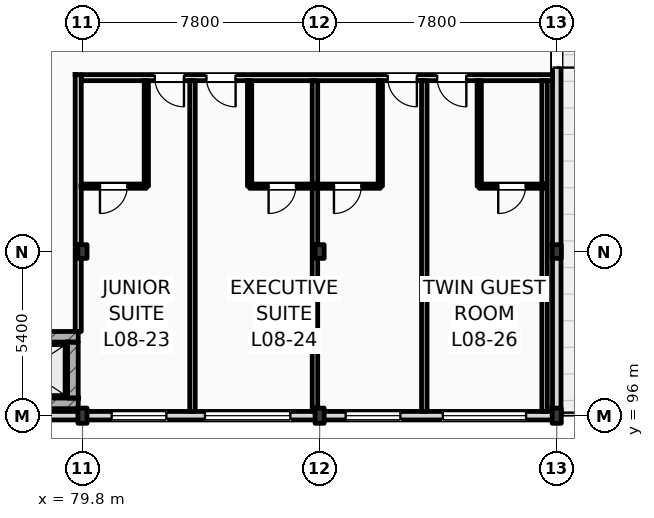
"""IFC4 building model, lengths in metres.
Left out: names, types, materials, properties, quantities, classifications, styles, units other than length and angle.
Written with IfcOpenShell. Run it as: python <this file> out.ifc"""

import sys

from ifc_helpers import new_model, si_unit, direction, frame, frame_2d, origin, origin_2d, place, context, subcontext, project, spatial, rectangle, i_section, extrude, element, fill, save


model = new_model("IFC4")
c1 = context("Model", 3, precision=1e-05, world=origin(), true_north=direction((0.0, 1.0)))
c2 = subcontext(c1, "Body", "Model", "MODEL_VIEW")
j1 = project(units=[si_unit("LENGTHUNIT", "METRE"), si_unit("PLANEANGLEUNIT", "RADIAN")], contexts=[c1])
p1 = place(None, origin())
s1 = spatial("IfcSite", under=j1, at=p1, CompositionType="ELEMENT")
p2 = place(p1, origin())
s2 = spatial("IfcBuilding", under=s1, at=p2, CompositionType="ELEMENT")
p3 = place(p2, frame((0.0, 0.0, 35.4)))
s3 = spatial("IfcBuildingStorey", under=s2, at=p3, CompositionType="ELEMENT", Elevation=35.4)
p4 = place(p3, frame((79.8, 96.0, 0.0), z_axis=(0.0, 0.0, 1.0), x_axis=(1.0, 0.0, 0.0)))
e1 = element("IfcColumn", 1, at=p4, inside=s3, PredefinedType="COLUMN", context=c2, shape_type="SweptSolid", body=[
    extrude(i_section(OverallWidth=0.3, OverallDepth=0.5, WebThickness=0.014, FlangeThickness=0.028, FilletRadius=0.027, at=origin_2d()), origin(), (0.0, 0.0, 1.0), 3.6),
])
p5 = place(p3, frame((79.8, 101.4, 0.0), z_axis=(0.0, 0.0, 1.0), x_axis=(1.0, 0.0, 0.0)))
e2 = element("IfcColumn", 2, at=p5, inside=s3, PredefinedType="COLUMN", context=c2, shape_type="SweptSolid", body=[
    extrude(i_section(OverallWidth=0.3, OverallDepth=0.45, WebThickness=0.014, FlangeThickness=0.026, FilletRadius=0.027, at=origin_2d()), origin(), (0.0, 0.0, 1.0), 3.6),
])
p6 = place(p3, frame((87.6, 96.0, 0.0), z_axis=(0.0, 0.0, 1.0), x_axis=(1.0, 0.0, 0.0)))
e3 = element("IfcColumn", 3, at=p6, inside=s3, PredefinedType="COLUMN", context=c2, shape_type="SweptSolid", body=[
    extrude(i_section(OverallWidth=0.3, OverallDepth=0.5, WebThickness=0.014, FlangeThickness=0.028, FilletRadius=0.027, at=origin_2d()), origin(), (0.0, 0.0, 1.0), 3.6),
])
p7 = place(p3, frame((87.6, 101.4, 0.0), z_axis=(0.0, 0.0, 1.0), x_axis=(1.0, 0.0, 0.0)))
e4 = element("IfcColumn", 4, at=p7, inside=s3, PredefinedType="COLUMN", context=c2, shape_type="SweptSolid", body=[
    extrude(i_section(OverallWidth=0.3, OverallDepth=0.45, WebThickness=0.014, FlangeThickness=0.026, FilletRadius=0.027, at=origin_2d()), origin(), (0.0, 0.0, 1.0), 3.6),
])
p8 = place(p3, frame((95.4, 96.0, 0.0), z_axis=(0.0, 0.0, 1.0), x_axis=(1.0, 0.0, 0.0)))
e5 = element("IfcColumn", 5, at=p8, inside=s3, PredefinedType="COLUMN", context=c2, shape_type="SweptSolid", body=[
    extrude(i_section(OverallWidth=0.3, OverallDepth=0.5, WebThickness=0.014, FlangeThickness=0.028, FilletRadius=0.027, at=origin_2d()), origin(), (0.0, 0.0, 1.0), 3.6),
])
p9 = place(p3, frame((95.4, 101.4, 0.0), z_axis=(0.0, 0.0, 1.0), x_axis=(1.0, 0.0, 0.0)))
e6 = element("IfcColumn", 6, at=p9, inside=s3, PredefinedType="COLUMN", context=c2, shape_type="SweptSolid", body=[
    extrude(i_section(OverallWidth=0.3, OverallDepth=0.45, WebThickness=0.014, FlangeThickness=0.026, FilletRadius=0.027, at=origin_2d()), origin(), (0.0, 0.0, 1.0), 3.6),
])
p10 = place(p3, frame((95.4, 96.0, 0.0), z_axis=(0.0, 0.0, 1.0), x_axis=(0.0, 1.0, 0.0)))
e7 = element("IfcWall", 7, at=p10, inside=s3, PredefinedType="STANDARD", context=c2, shape_type="SweptSolid", body=[
    extrude(rectangle(XDim=22.0, YDim=0.28, at=frame_2d((11.0, 0.0))), origin(), (0.0, 0.0, 1.0), 3.01),
])
p11 = place(p10, frame((11.45, 0.0, 0.0)))
e8 = element("IfcOpeningElement", 8, at=p11, cuts=e7, PredefinedType="OPENING", context=c2, shape_type="SweptSolid", body=[
    extrude(rectangle(XDim=1.8, YDim=2.4, at=frame_2d((0.9, 1.2))), frame((0.0, 0.15, 0.0), z_axis=(0.0, -1.0, 0.0), x_axis=(1.0, 0.0, 0.0)), (0.0, 0.0, 1.0), 0.3),
])
p12 = place(p3, frame((25.2, 96.0, 0.0), z_axis=(0.0, 0.0, 1.0), x_axis=(1.0, 0.0, 0.0)))
e9 = element("IfcWall", 9, at=p12, inside=s3, PredefinedType="STANDARD", context=c2, shape_type="SweptSolid", body=[
    extrude(rectangle(XDim=70.2, YDim=0.28, at=frame_2d((35.1, 0.0))), origin(), (0.0, 0.0, 1.0), 2.92),
])
p13 = place(p12, frame((16.694, 0.0, 0.9)))
e10 = element("IfcOpeningElement", 10, at=p13, cuts=e9, PredefinedType="OPENING", context=c2, shape_type="SweptSolid", body=[
    extrude(rectangle(XDim=1.8, YDim=1.84, at=frame_2d((0.9, 0.92))), frame((0.0, 0.15, 0.0), z_axis=(0.0, -1.0, 0.0), x_axis=(1.0, 0.0, 0.0)), (0.0, 0.0, 1.0), 0.3),
])
p14 = place(p12, frame((20.482, 0.0, 0.9)))
e11 = element("IfcOpeningElement", 11, at=p14, cuts=e9, PredefinedType="OPENING", context=c2, shape_type="SweptSolid", body=[
    extrude(rectangle(XDim=1.95, YDim=1.84, at=frame_2d((0.975, 0.92))), frame((0.0, 0.15, 0.0), z_axis=(0.0, -1.0, 0.0), x_axis=(1.0, 0.0, 0.0)), (0.0, 0.0, 1.0), 0.3),
])
p15 = place(p12, frame((24.316, 0.0, 0.9)))
e12 = element("IfcOpeningElement", 12, at=p15, cuts=e9, PredefinedType="OPENING", context=c2, shape_type="SweptSolid", body=[
    extrude(rectangle(XDim=2.1, YDim=1.84, at=frame_2d((1.05, 0.92))), frame((0.0, 0.15, 0.0), z_axis=(0.0, -1.0, 0.0), x_axis=(1.0, 0.0, 0.0)), (0.0, 0.0, 1.0), 0.3),
])
p16 = place(p12, frame((28.149, 0.0, 0.9)))
e13 = element("IfcOpeningElement", 13, at=p16, cuts=e9, PredefinedType="OPENING", context=c2, shape_type="SweptSolid", body=[
    extrude(rectangle(XDim=2.25, YDim=1.84, at=frame_2d((1.125, 0.92))), frame((0.0, 0.15, 0.0), z_axis=(0.0, -1.0, 0.0), x_axis=(1.0, 0.0, 0.0)), (0.0, 0.0, 1.0), 0.3),
])
p17 = place(p12, frame((31.983, 0.0, 0.9)))
e14 = element("IfcOpeningElement", 14, at=p17, cuts=e9, PredefinedType="OPENING", context=c2, shape_type="SweptSolid", body=[
    extrude(rectangle(XDim=2.4, YDim=1.84, at=frame_2d((1.2, 0.92))), frame((0.0, 0.15, 0.0), z_axis=(0.0, -1.0, 0.0), x_axis=(1.0, 0.0, 0.0)), (0.0, 0.0, 1.0), 0.3),
])
p18 = place(p12, frame((35.682, 0.0, 0.9)))
e15 = element("IfcOpeningElement", 15, at=p18, cuts=e9, PredefinedType="OPENING", context=c2, shape_type="SweptSolid", body=[
    extrude(rectangle(XDim=2.508, YDim=1.84, at=frame_2d((1.254, 0.92))), frame((0.0, 0.15, 0.0), z_axis=(0.0, -1.0, 0.0), x_axis=(1.0, 0.0, 0.0)), (0.0, 0.0, 1.0), 0.3),
])
p19 = place(p12, frame((55.56, 0.0, 0.9)))
e16 = element("IfcOpeningElement", 16, at=p19, cuts=e9, PredefinedType="OPENING", context=c2, shape_type="SweptSolid", body=[
    extrude(rectangle(XDim=1.8, YDim=1.84, at=frame_2d((0.9, 0.92))), frame((0.0, 0.15, 0.0), z_axis=(0.0, -1.0, 0.0), x_axis=(1.0, 0.0, 0.0)), (0.0, 0.0, 1.0), 0.3),
])
p20 = place(p12, frame((58.628, 0.0, 0.9)))
e17 = element("IfcOpeningElement", 17, at=p20, cuts=e9, PredefinedType="OPENING", context=c2, shape_type="SweptSolid", body=[
    extrude(rectangle(XDim=2.809, YDim=1.84, at=frame_2d((1.405, 0.92))), frame((0.0, 0.15, 0.0), z_axis=(0.0, -1.0, 0.0), x_axis=(1.0, 0.0, 0.0)), (0.0, 0.0, 1.0), 0.3),
])
p21 = place(p12, frame((63.257, 0.0, 0.9)))
e18 = element("IfcOpeningElement", 18, at=p21, cuts=e9, PredefinedType="OPENING", context=c2, shape_type="SweptSolid", body=[
    extrude(rectangle(XDim=1.8, YDim=1.84, at=frame_2d((0.9, 0.92))), frame((0.0, 0.15, 0.0), z_axis=(0.0, -1.0, 0.0), x_axis=(1.0, 0.0, 0.0)), (0.0, 0.0, 1.0), 0.3),
])
p22 = place(p12, frame((66.453, 0.0, 0.9)))
e19 = element("IfcOpeningElement", 19, at=p22, cuts=e9, PredefinedType="OPENING", context=c2, shape_type="SweptSolid", body=[
    extrude(rectangle(XDim=2.737, YDim=1.84, at=frame_2d((1.369, 0.92))), frame((0.0, 0.15, 0.0), z_axis=(0.0, -1.0, 0.0), x_axis=(1.0, 0.0, 0.0)), (0.0, 0.0, 1.0), 0.3),
])
p23 = place(p3, frame((76.67, 98.595, 0.0), z_axis=(0.0, 0.0, 1.0), x_axis=(1.0, 0.0, 0.0)))
e20 = element("IfcWall", 20, at=p23, inside=s3, PredefinedType="SHEAR", context=c2, shape_type="SweptSolid", body=[
    extrude(rectangle(XDim=2.99, YDim=0.35, at=frame_2d((1.495, 0.0))), origin(), (0.0, 0.0, 1.0), 3.38),
])
p24 = place(p23, frame((0.695, 0.0, 0.0)))
e21 = element("IfcOpeningElement", 21, at=p24, cuts=e20, PredefinedType="OPENING", context=c2, shape_type="SweptSolid", body=[
    extrude(rectangle(XDim=1.25, YDim=2.25, at=frame_2d((0.625, 1.125))), frame((0.0, 0.185, 0.0), z_axis=(0.0, -1.0, 0.0), x_axis=(1.0, 0.0, 0.0)), (0.0, 0.0, 1.0), 0.37),
])
p25 = place(p3, frame((76.67, 96.405, 0.0), z_axis=(0.0, 0.0, 1.0), x_axis=(1.0, 0.0, 0.0)))
e22 = element("IfcWall", 22, at=p25, inside=s3, PredefinedType="SHEAR", context=c2, shape_type="SweptSolid", body=[
    extrude(rectangle(XDim=2.99, YDim=0.35, at=frame_2d((1.495, 0.0))), origin(), (0.0, 0.0, 1.0), 3.38),
])
p26 = place(p3, frame((79.485, 96.58, 0.0), z_axis=(0.0, 0.0, 1.0), x_axis=(0.0, 1.0, 0.0)))
e23 = element("IfcWall", 23, at=p26, inside=s3, PredefinedType="SHEAR", context=c2, shape_type="SweptSolid", body=[
    extrude(rectangle(XDim=1.84, YDim=0.35, at=frame_2d((0.92, 0.0))), origin(), (0.0, 0.0, 1.0), 3.01),
])
p27 = place(p3, frame((79.76, 107.12, 0.0), z_axis=(0.0, 0.0, 1.0), x_axis=(1.0, 0.0, 0.0)))
e24 = element("IfcWall", 24, at=p27, inside=s3, PredefinedType="PARTITIONING", context=c2, shape_type="SweptSolid", body=[
    extrude(rectangle(XDim=15.5, YDim=0.2, at=frame_2d((7.75, 0.0))), origin(), (0.0, 0.0, 1.0), 3.38),
])
p28 = place(p27, frame((2.419, 0.0, 0.0)))
e25 = element("IfcOpeningElement", 25, at=p28, cuts=e24, PredefinedType="OPENING", context=c2, shape_type="SweptSolid", body=[
    extrude(rectangle(XDim=0.96, YDim=2.2, at=frame_2d((0.48, 1.1))), frame((0.0, 0.11, 0.0), z_axis=(0.0, -1.0, 0.0), x_axis=(1.0, 0.0, 0.0)), (0.0, 0.0, 1.0), 0.22),
])
p29 = place(p27, frame((4.117, 0.0, 0.0)))
e26 = element("IfcOpeningElement", 26, at=p29, cuts=e24, PredefinedType="OPENING", context=c2, shape_type="SweptSolid", body=[
    extrude(rectangle(XDim=0.96, YDim=2.2, at=frame_2d((0.48, 1.1))), frame((0.0, 0.11, 0.0), z_axis=(0.0, -1.0, 0.0), x_axis=(1.0, 0.0, 0.0)), (0.0, 0.0, 1.0), 0.22),
])
p30 = place(p27, frame((10.08, 0.0, 0.0)))
e27 = element("IfcOpeningElement", 27, at=p30, cuts=e24, PredefinedType="OPENING", context=c2, shape_type="SweptSolid", body=[
    extrude(rectangle(XDim=0.96, YDim=2.2, at=frame_2d((0.48, 1.1))), frame((0.0, 0.11, 0.0), z_axis=(0.0, -1.0, 0.0), x_axis=(1.0, 0.0, 0.0)), (0.0, 0.0, 1.0), 0.22),
])
p31 = place(p27, frame((11.706, 0.0, 0.0)))
e28 = element("IfcOpeningElement", 28, at=p31, cuts=e24, PredefinedType="OPENING", context=c2, shape_type="SweptSolid", body=[
    extrude(rectangle(XDim=0.96, YDim=2.2, at=frame_2d((0.48, 1.1))), frame((0.0, 0.11, 0.0), z_axis=(0.0, -1.0, 0.0), x_axis=(1.0, 0.0, 0.0)), (0.0, 0.0, 1.0), 0.22),
])
p32 = place(p3, frame((79.66, 98.77, 0.0), z_axis=(0.0, 0.0, 1.0), x_axis=(0.0, 1.0, 0.0)))
e29 = element("IfcWall", 29, at=p32, inside=s3, PredefinedType="PARTITIONING", context=c2, shape_type="SweptSolid", body=[
    extrude(rectangle(XDim=8.45, YDim=0.2, at=frame_2d((4.225, 0.0))), origin(), (0.0, 0.0, 1.0), 3.01),
])
p33 = place(p3, frame((83.418, 96.14, 0.0), z_axis=(0.0, 0.0, 1.0), x_axis=(0.0, 1.0, 0.0)))
e30 = element("IfcWall", 30, at=p33, inside=s3, PredefinedType="PARTITIONING", context=c2, shape_type="SweptSolid", body=[
    extrude(rectangle(XDim=10.88, YDim=0.18, at=frame_2d((5.44, 0.0))), origin(), (0.0, 0.0, 1.0), 3.38),
])
p34 = place(p3, frame((81.9, 103.55, 0.0), z_axis=(0.0, 0.0, 1.0), x_axis=(0.0, 1.0, 0.0)))
e31 = element("IfcWall", 31, at=p34, inside=s3, PredefinedType="PARTITIONING", context=c2, shape_type="SweptSolid", body=[
    extrude(rectangle(XDim=3.47, YDim=0.14, at=frame_2d((1.735, 0.0))), origin(), (0.0, 0.0, 1.0), 3.38),
])
p35 = place(p3, frame((79.75, 103.55, 0.0), z_axis=(0.0, 0.0, 1.0), x_axis=(1.0, 0.0, 0.0)))
e32 = element("IfcWall", 32, at=p35, inside=s3, PredefinedType="PARTITIONING", context=c2, shape_type="SweptSolid", body=[
    extrude(rectangle(XDim=2.15, YDim=0.14, at=frame_2d((1.075, 0.0))), origin(), (0.0, 0.0, 1.0), 3.38),
])
p36 = place(p35, frame((0.625, 0.0, 0.0)))
e33 = element("IfcOpeningElement", 33, at=p36, cuts=e32, PredefinedType="OPENING", context=c2, shape_type="SweptSolid", body=[
    extrude(rectangle(XDim=0.9, YDim=2.1, at=frame_2d((0.45, 1.05))), frame((0.0, 0.08, 0.0), z_axis=(0.0, -1.0, 0.0), x_axis=(1.0, 0.0, 0.0)), (0.0, 0.0, 1.0), 0.16),
])
p37 = place(p3, frame((87.447, 96.14, 0.0), z_axis=(0.0, 0.0, 1.0), x_axis=(0.0, 1.0, 0.0)))
e34 = element("IfcWall", 34, at=p37, inside=s3, PredefinedType="PARTITIONING", context=c2, shape_type="SweptSolid", body=[
    extrude(rectangle(XDim=10.88, YDim=0.18, at=frame_2d((5.44, 0.0))), origin(), (0.0, 0.0, 1.0), 3.01),
])
p38 = place(p3, frame((85.297, 103.55, 0.0), z_axis=(0.0, 0.0, 1.0), x_axis=(0.0, 1.0, 0.0)))
e35 = element("IfcWall", 35, at=p38, inside=s3, PredefinedType="PARTITIONING", context=c2, shape_type="SweptSolid", body=[
    extrude(rectangle(XDim=3.47, YDim=0.14, at=frame_2d((1.735, 0.0))), origin(), (0.0, 0.0, 1.0), 3.38),
])
p39 = place(p3, frame((85.297, 103.55, 0.0), z_axis=(0.0, 0.0, 1.0), x_axis=(1.0, 0.0, 0.0)))
e36 = element("IfcWall", 36, at=p39, inside=s3, PredefinedType="PARTITIONING", context=c2, shape_type="SweptSolid", body=[
    extrude(rectangle(XDim=2.15, YDim=0.14, at=frame_2d((1.075, 0.0))), origin(), (0.0, 0.0, 1.0), 3.38),
])
p40 = place(p39, frame((0.625, 0.0, 0.0)))
e37 = element("IfcOpeningElement", 37, at=p40, cuts=e36, PredefinedType="OPENING", context=c2, shape_type="SweptSolid", body=[
    extrude(rectangle(XDim=0.9, YDim=2.1, at=frame_2d((0.45, 1.05))), frame((0.0, 0.08, 0.0), z_axis=(0.0, -1.0, 0.0), x_axis=(1.0, 0.0, 0.0)), (0.0, 0.0, 1.0), 0.16),
])
p41 = place(p3, frame((91.043, 96.14, 0.0), z_axis=(0.0, 0.0, 1.0), x_axis=(0.0, 1.0, 0.0)))
e38 = element("IfcWall", 38, at=p41, inside=s3, PredefinedType="PARTITIONING", context=c2, shape_type="SweptSolid", body=[
    extrude(rectangle(XDim=10.88, YDim=0.18, at=frame_2d((5.44, 0.0))), origin(), (0.0, 0.0, 1.0), 3.38),
])
p42 = place(p3, frame((89.597, 103.55, 0.0), z_axis=(0.0, 0.0, 1.0), x_axis=(0.0, 1.0, 0.0)))
e39 = element("IfcWall", 39, at=p42, inside=s3, PredefinedType="PARTITIONING", context=c2, shape_type="SweptSolid", body=[
    extrude(rectangle(XDim=3.47, YDim=0.14, at=frame_2d((1.735, 0.0))), origin(), (0.0, 0.0, 1.0), 3.38),
])
p43 = place(p3, frame((87.447, 103.55, 0.0), z_axis=(0.0, 0.0, 1.0), x_axis=(1.0, 0.0, 0.0)))
e40 = element("IfcWall", 40, at=p43, inside=s3, PredefinedType="PARTITIONING", context=c2, shape_type="SweptSolid", body=[
    extrude(rectangle(XDim=2.15, YDim=0.14, at=frame_2d((1.075, 0.0))), origin(), (0.0, 0.0, 1.0), 3.38),
])
p44 = place(p43, frame((0.625, 0.0, 0.0)))
e41 = element("IfcOpeningElement", 41, at=p44, cuts=e40, PredefinedType="OPENING", context=c2, shape_type="SweptSolid", body=[
    extrude(rectangle(XDim=0.9, YDim=2.1, at=frame_2d((0.45, 1.05))), frame((0.0, 0.08, 0.0), z_axis=(0.0, -1.0, 0.0), x_axis=(1.0, 0.0, 0.0)), (0.0, 0.0, 1.0), 0.16),
])
p45 = place(p3, frame((95.0, 96.14, 0.0), z_axis=(0.0, 0.0, 1.0), x_axis=(0.0, 1.0, 0.0)))
e42 = element("IfcWall", 42, at=p45, inside=s3, PredefinedType="PARTITIONING", context=c2, shape_type="SweptSolid", body=[
    extrude(rectangle(XDim=10.88, YDim=0.18, at=frame_2d((5.44, 0.0))), origin(), (0.0, 0.0, 1.0), 3.38),
])
p46 = place(p3, frame((92.85, 103.55, 0.0), z_axis=(0.0, 0.0, 1.0), x_axis=(0.0, 1.0, 0.0)))
e43 = element("IfcWall", 43, at=p46, inside=s3, PredefinedType="PARTITIONING", context=c2, shape_type="SweptSolid", body=[
    extrude(rectangle(XDim=3.47, YDim=0.14, at=frame_2d((1.735, 0.0))), origin(), (0.0, 0.0, 1.0), 3.07),
])
p47 = place(p3, frame((92.85, 103.55, 0.0), z_axis=(0.0, 0.0, 1.0), x_axis=(1.0, 0.0, 0.0)))
e44 = element("IfcWall", 44, at=p47, inside=s3, PredefinedType="PARTITIONING", context=c2, shape_type="SweptSolid", body=[
    extrude(rectangle(XDim=2.15, YDim=0.14, at=frame_2d((1.075, 0.0))), origin(), (0.0, 0.0, 1.0), 3.38),
])
p48 = place(p47, frame((0.625, 0.0, 0.0)))
e45 = element("IfcOpeningElement", 45, at=p48, cuts=e44, PredefinedType="OPENING", context=c2, shape_type="SweptSolid", body=[
    extrude(rectangle(XDim=0.9, YDim=2.1, at=frame_2d((0.45, 1.05))), frame((0.0, 0.08, 0.0), z_axis=(0.0, -1.0, 0.0), x_axis=(1.0, 0.0, 0.0)), (0.0, 0.0, 1.0), 0.16),
])
p49 = place(p11, frame((1.8, 0.0, 0.0), z_axis=(0.0, 0.0, 1.0), x_axis=(-1.0, 0.0, 0.0)))
e46 = element("IfcDoor", 46, at=p49, inside=s3, OperationType="DOUBLE_SWING_LEFT", PredefinedType="DOOR", context=c2, shape_type="SweptSolid", body=[
    extrude(rectangle(XDim=1.8, YDim=2.4, at=frame_2d((0.9, 1.2))), frame((0.0, 0.025, 0.0), z_axis=(0.0, -1.0, 0.0), x_axis=(1.0, 0.0, 0.0)), (0.0, 0.0, 1.0), 0.05),
])
fill(e8, e46)
p50 = place(p19, origin())
e47 = element("IfcWindow", 47, at=p50, inside=s3, PartitioningType="DOUBLE_PANEL_VERTICAL", PredefinedType="WINDOW", context=c2, shape_type="SweptSolid", body=[
    extrude(rectangle(XDim=1.8, YDim=1.84, at=frame_2d((0.9, 0.92))), frame((0.0, 0.03, 0.0), z_axis=(0.0, -1.0, 0.0), x_axis=(1.0, 0.0, 0.0)), (0.0, 0.0, 1.0), 0.06),
])
fill(e16, e47)
p51 = place(p20, origin())
e48 = element("IfcWindow", 48, at=p51, inside=s3, PartitioningType="DOUBLE_PANEL_VERTICAL", PredefinedType="WINDOW", context=c2, shape_type="SweptSolid", body=[
    extrude(rectangle(XDim=2.809, YDim=1.84, at=frame_2d((1.405, 0.92))), frame((0.0, 0.03, 0.0), z_axis=(0.0, -1.0, 0.0), x_axis=(1.0, 0.0, 0.0)), (0.0, 0.0, 1.0), 0.06),
])
fill(e17, e48)
p52 = place(p21, origin())
e49 = element("IfcWindow", 49, at=p52, inside=s3, PartitioningType="DOUBLE_PANEL_VERTICAL", PredefinedType="WINDOW", context=c2, shape_type="SweptSolid", body=[
    extrude(rectangle(XDim=1.8, YDim=1.84, at=frame_2d((0.9, 0.92))), frame((0.0, 0.03, 0.0), z_axis=(0.0, -1.0, 0.0), x_axis=(1.0, 0.0, 0.0)), (0.0, 0.0, 1.0), 0.06),
])
fill(e18, e49)
p53 = place(p22, origin())
e50 = element("IfcWindow", 50, at=p53, inside=s3, PartitioningType="DOUBLE_PANEL_VERTICAL", PredefinedType="WINDOW", context=c2, shape_type="SweptSolid", body=[
    extrude(rectangle(XDim=2.737, YDim=1.84, at=frame_2d((1.369, 0.92))), frame((0.0, 0.03, 0.0), z_axis=(0.0, -1.0, 0.0), x_axis=(1.0, 0.0, 0.0)), (0.0, 0.0, 1.0), 0.06),
])
fill(e19, e50)
p54 = place(p28, frame((0.96, 0.0, 0.0), z_axis=(0.0, 0.0, 1.0), x_axis=(-1.0, 0.0, 0.0)))
e51 = element("IfcDoor", 51, at=p54, inside=s3, OperationType="SINGLE_SWING_RIGHT", PredefinedType="DOOR", context=c2, shape_type="SweptSolid", body=[
    extrude(rectangle(XDim=0.96, YDim=2.2, at=frame_2d((0.48, 1.1))), frame((0.0, 0.025, 0.0), z_axis=(0.0, -1.0, 0.0), x_axis=(1.0, 0.0, 0.0)), (0.0, 0.0, 1.0), 0.05),
])
fill(e25, e51)
p55 = place(p36, frame((0.9, 0.0, 0.0), z_axis=(0.0, 0.0, 1.0), x_axis=(-1.0, 0.0, 0.0)))
e52 = element("IfcDoor", 52, at=p55, inside=s3, OperationType="SINGLE_SWING_LEFT", PredefinedType="DOOR", context=c2, shape_type="SweptSolid", body=[
    extrude(rectangle(XDim=0.9, YDim=2.1, at=frame_2d((0.45, 1.05))), frame((0.0, 0.025, 0.0), z_axis=(0.0, -1.0, 0.0), x_axis=(1.0, 0.0, 0.0)), (0.0, 0.0, 1.0), 0.05),
])
fill(e33, e52)
p56 = place(p29, frame((0.96, 0.0, 0.0), z_axis=(0.0, 0.0, 1.0), x_axis=(-1.0, 0.0, 0.0)))
e53 = element("IfcDoor", 53, at=p56, inside=s3, OperationType="SINGLE_SWING_RIGHT", PredefinedType="DOOR", context=c2, shape_type="SweptSolid", body=[
    extrude(rectangle(XDim=0.96, YDim=2.2, at=frame_2d((0.48, 1.1))), frame((0.0, 0.025, 0.0), z_axis=(0.0, -1.0, 0.0), x_axis=(1.0, 0.0, 0.0)), (0.0, 0.0, 1.0), 0.05),
])
fill(e26, e53)
p57 = place(p40, frame((0.9, 0.0, 0.0), z_axis=(0.0, 0.0, 1.0), x_axis=(-1.0, 0.0, 0.0)))
e54 = element("IfcDoor", 54, at=p57, inside=s3, OperationType="SINGLE_SWING_LEFT", PredefinedType="DOOR", context=c2, shape_type="SweptSolid", body=[
    extrude(rectangle(XDim=0.9, YDim=2.1, at=frame_2d((0.45, 1.05))), frame((0.0, 0.025, 0.0), z_axis=(0.0, -1.0, 0.0), x_axis=(1.0, 0.0, 0.0)), (0.0, 0.0, 1.0), 0.05),
])
fill(e37, e54)
p58 = place(p30, frame((0.96, 0.0, 0.0), z_axis=(0.0, 0.0, 1.0), x_axis=(-1.0, 0.0, 0.0)))
e55 = element("IfcDoor", 55, at=p58, inside=s3, OperationType="SINGLE_SWING_RIGHT", PredefinedType="DOOR", context=c2, shape_type="SweptSolid", body=[
    extrude(rectangle(XDim=0.96, YDim=2.2, at=frame_2d((0.48, 1.1))), frame((0.0, 0.025, 0.0), z_axis=(0.0, -1.0, 0.0), x_axis=(1.0, 0.0, 0.0)), (0.0, 0.0, 1.0), 0.05),
])
fill(e27, e55)
p59 = place(p44, frame((0.9, 0.0, 0.0), z_axis=(0.0, 0.0, 1.0), x_axis=(-1.0, 0.0, 0.0)))
e56 = element("IfcDoor", 56, at=p59, inside=s3, OperationType="SINGLE_SWING_LEFT", PredefinedType="DOOR", context=c2, shape_type="SweptSolid", body=[
    extrude(rectangle(XDim=0.9, YDim=2.1, at=frame_2d((0.45, 1.05))), frame((0.0, 0.025, 0.0), z_axis=(0.0, -1.0, 0.0), x_axis=(1.0, 0.0, 0.0)), (0.0, 0.0, 1.0), 0.05),
])
fill(e41, e56)
p60 = place(p31, frame((0.96, 0.0, 0.0), z_axis=(0.0, 0.0, 1.0), x_axis=(-1.0, 0.0, 0.0)))
e57 = element("IfcDoor", 57, at=p60, inside=s3, OperationType="SINGLE_SWING_RIGHT", PredefinedType="DOOR", context=c2, shape_type="SweptSolid", body=[
    extrude(rectangle(XDim=0.96, YDim=2.2, at=frame_2d((0.48, 1.1))), frame((0.0, 0.025, 0.0), z_axis=(0.0, -1.0, 0.0), x_axis=(1.0, 0.0, 0.0)), (0.0, 0.0, 1.0), 0.05),
])
fill(e28, e57)
p61 = place(p48, frame((0.9, 0.0, 0.0), z_axis=(0.0, 0.0, 1.0), x_axis=(-1.0, 0.0, 0.0)))
e58 = element("IfcDoor", 58, at=p61, inside=s3, OperationType="SINGLE_SWING_LEFT", PredefinedType="DOOR", context=c2, shape_type="SweptSolid", body=[
    extrude(rectangle(XDim=0.9, YDim=2.1, at=frame_2d((0.45, 1.05))), frame((0.0, 0.025, 0.0), z_axis=(0.0, -1.0, 0.0), x_axis=(1.0, 0.0, 0.0)), (0.0, 0.0, 1.0), 0.05),
])
fill(e45, e58)
save(model, sys.argv[1])
